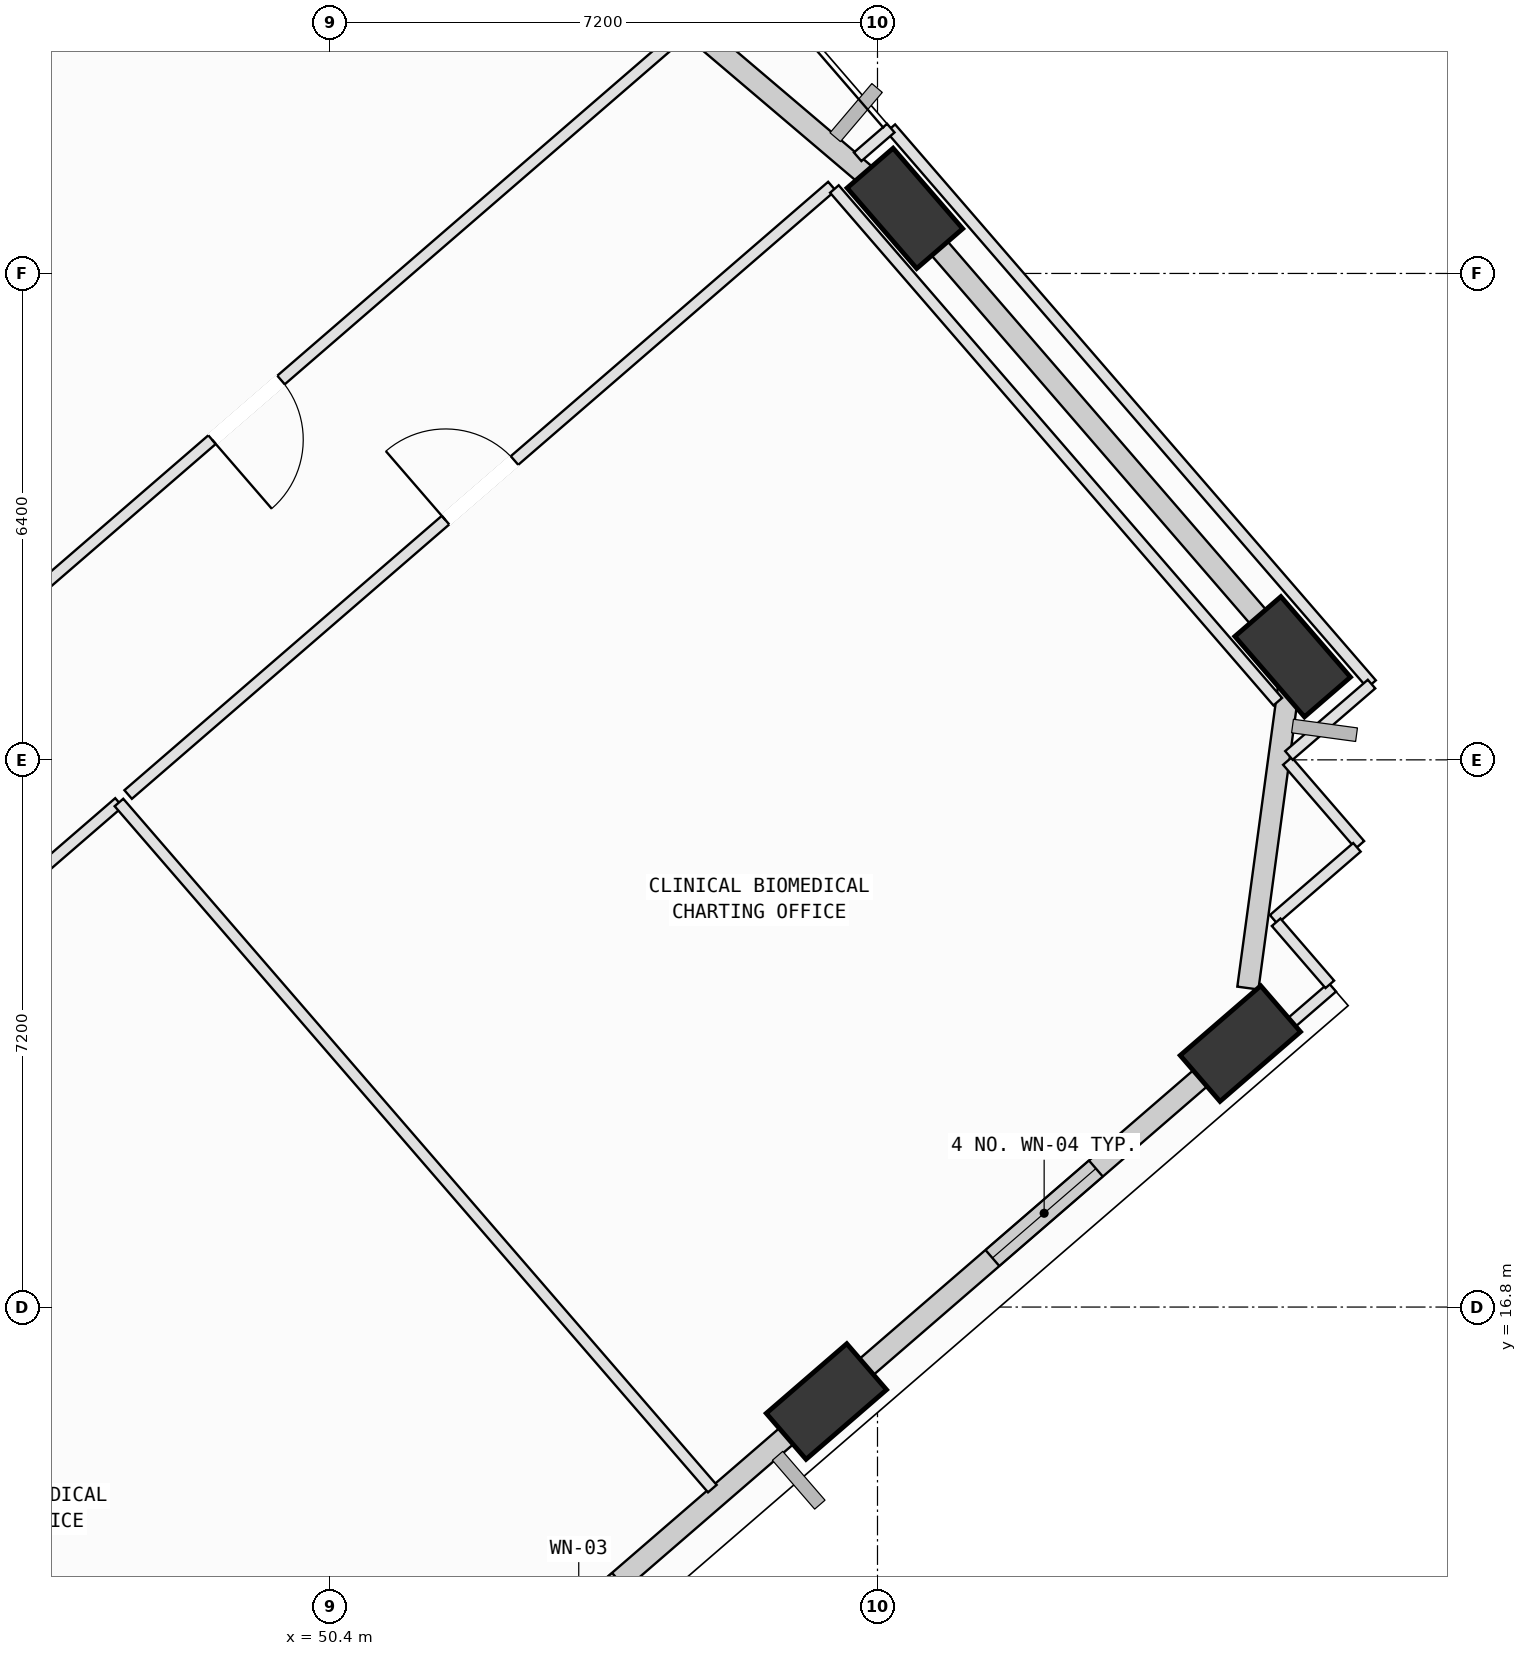
"""IFC4 building model, lengths in metres.
Left out: names, types, materials, properties, quantities, classifications, styles, units other than length and angle.
Written with IfcOpenShell. Run it as: python <this file> out.ifc"""

import sys

from ifc_helpers import new_model, si_unit, direction, frame, frame_2d, origin, origin_2d, place, context, subcontext, project, spatial, rectangle, extrude, element, fill, save


model = new_model("IFC4")
c1 = context("Model", 3, precision=1e-05, world=origin(), true_north=direction((0.0, 1.0)))
c2 = subcontext(c1, "Body", "Model", "MODEL_VIEW")
j1 = project(units=[si_unit("LENGTHUNIT", "METRE"), si_unit("PLANEANGLEUNIT", "RADIAN")], contexts=[c1])
p1 = place(None, origin())
s1 = spatial("IfcSite", under=j1, at=p1, CompositionType="ELEMENT")
p2 = place(p1, origin())
s2 = spatial("IfcBuilding", under=s1, at=p2, CompositionType="ELEMENT")
p3 = place(p2, frame((0.0, 0.0, 197.8)))
s3 = spatial("IfcBuildingStorey", under=s2, at=p3, CompositionType="ELEMENT", Elevation=197.8)
p4 = place(p3, frame((56.928, 15.557, 0.002), z_axis=(0.037308659292, 0.096492102534, 0.994634273535), x_axis=(-0.940140058416, -0.334002750608, 0.067667075804)))
e1 = element("IfcColumn", 1, at=p4, inside=s3, PredefinedType="COLUMN", context=c2, shape_type="SweptSolid", body=[
    extrude(rectangle(XDim=1.4, YDim=0.8, at=origin_2d()), origin(), (0.0, 0.0, 1.0), 4.018),
])
p5 = place(p3, frame((62.374, 20.267, 0.002), z_axis=(0.017710064667, 0.118511871091, 0.99279468674), x_axis=(-0.84409135877, -0.530440201598, 0.078377104935)))
e2 = element("IfcColumn", 2, at=p5, inside=s3, PredefinedType="COLUMN", context=c2, shape_type="SweptSolid", body=[
    extrude(rectangle(XDim=1.4, YDim=0.8, at=origin_2d()), origin(), (0.0, 0.0, 1.0), 4.025),
])
p6 = place(p3, frame((63.062, 25.356, 0.002), z_axis=(-0.003335213178, 0.121219838947, 0.992620081904), x_axis=(0.67448420136, -0.73256874744, 0.091728361977)))
e3 = element("IfcColumn", 3, at=p6, inside=s3, PredefinedType="COLUMN", context=c2, shape_type="SweptSolid", body=[
    extrude(rectangle(XDim=1.4, YDim=0.8, at=origin_2d()), origin(), (0.0, 0.0, 1.0), 4.026),
])
p7 = place(p3, frame((57.96, 31.257, 0.002), z_axis=(-0.027403036111, 0.100194249551, 0.994590461431), x_axis=(0.829382951697, -0.553127674355, 0.078572866163)))
e4 = element("IfcColumn", 4, at=p7, inside=s3, PredefinedType="COLUMN", context=c2, shape_type="SweptSolid", body=[
    extrude(rectangle(XDim=1.4, YDim=0.8, at=origin_2d()), origin(), (0.0, 0.0, 1.0), 4.018),
])
p8 = place(p3, frame((56.699, 15.359, 0.0), z_axis=(0.0, 0.0, 1.0), x_axis=(-0.756411472006, -0.654096082405, 0.0)))
e5 = element("IfcWall", 5, at=p8, inside=s3, PredefinedType="SOLIDWALL", context=c2, shape_type="SweptSolid", body=[
    extrude(rectangle(XDim=6.218, YDim=0.28, at=frame_2d((3.109, 0.0))), origin(), (0.0, 0.0, 1.0), 3.265),
])
p9 = place(p8, frame((3.305, 0.0, 0.75)))
e6 = element("IfcOpeningElement", 6, at=p9, cuts=e5, PredefinedType="OPENING", context=c2, shape_type="SweptSolid", body=[
    extrude(rectangle(XDim=1.4, YDim=1.85, at=frame_2d((0.7, 0.925))), frame((0.0, 0.15, 0.0), z_axis=(0.0, -1.0, 0.0), x_axis=(1.0, 0.0, 0.0)), (0.0, 0.0, 1.0), 0.3),
])
p10 = place(p3, frame((62.156, 20.078, 0.0), z_axis=(0.0, 0.0, 1.0), x_axis=(-0.756391936457, -0.654118673073, 0.0)))
e7 = element("IfcWall", 7, at=p10, inside=s3, PredefinedType="SOLIDWALL", context=c2, shape_type="SweptSolid", body=[
    extrude(rectangle(XDim=6.242, YDim=0.28, at=frame_2d((3.121, 0.0))), origin(), (0.0, 0.0, 1.0), 3.265),
])
p11 = place(p10, frame((2.225, 0.0, 0.75)))
e8 = element("IfcOpeningElement", 8, at=p11, cuts=e7, PredefinedType="OPENING", context=c2, shape_type="SweptSolid", body=[
    extrude(rectangle(XDim=1.8, YDim=2.05, at=frame_2d((0.9, 1.025))), frame((0.0, 0.15, 0.0), z_axis=(0.0, -1.0, 0.0), x_axis=(1.0, 0.0, 0.0)), (0.0, 0.0, 1.0), 0.3),
])
p12 = place(p3, frame((63.029, 25.105, 0.0), z_axis=(0.0, 0.0, 1.0), x_axis=(-0.134053903039, -0.990974041577, 0.0)))
e9 = element("IfcWall", 9, at=p12, inside=s3, PredefinedType="SOLIDWALL", context=c2, shape_type="SweptSolid", body=[
    extrude(rectangle(XDim=4.145, YDim=0.28, at=frame_2d((2.073, 0.0))), origin(), (0.0, 0.0, 1.0), 3.265),
])
p13 = place(p3, frame((58.156, 31.03, 0.0), z_axis=(0.0, 0.0, 1.0), x_axis=(0.654086255928, -0.756419969201, 0.0)))
e10 = element("IfcWall", 10, at=p13, inside=s3, PredefinedType="SOLIDWALL", context=c2, shape_type="SweptSolid", body=[
    extrude(rectangle(XDim=6.84, YDim=0.28, at=frame_2d((3.42, 0.0))), origin(), (0.0, 0.0, 1.0), 3.265),
])
p14 = place(p3, frame((50.728, 37.404, 0.0), z_axis=(0.0, 0.0, 1.0), x_axis=(0.761999294939, -0.647577852086, 0.0)))
e11 = element("IfcWall", 11, at=p14, inside=s3, PredefinedType="SOLIDWALL", context=c2, shape_type="SweptSolid", body=[
    extrude(rectangle(XDim=8.838, YDim=0.28, at=frame_2d((4.419, 0.0))), origin(), (0.0, 0.0, 1.0), 3.265),
])
p15 = place(p3, frame((38.362, 15.433, 0.0), z_axis=(0.0, 0.0, 1.0), x_axis=(0.756407982528, 0.654100117694, 0.0)))
e12 = element("IfcWall", 12, at=p15, inside=s3, PredefinedType="PARTITIONING", context=c2, shape_type="SweptSolid", body=[
    extrude(rectangle(XDim=12.24, YDim=0.15, at=frame_2d((6.12, 0.0))), origin(), (0.0, 0.0, 1.0), 3.78),
])
p16 = place(p15, frame((5.52, 0.0, 0.0)))
e13 = element("IfcOpeningElement", 13, at=p16, cuts=e12, PredefinedType="OPENING", context=c2, shape_type="SweptSolid", body=[
    extrude(rectangle(XDim=1.2, YDim=2.15, at=frame_2d((0.6, 1.075))), frame((0.0, 0.085, 0.0), z_axis=(0.0, -1.0, 0.0), x_axis=(1.0, 0.0, 0.0)), (0.0, 0.0, 1.0), 0.17),
])
p17 = place(p3, frame((47.62, 23.439, 0.0), z_axis=(0.0, 0.0, 1.0), x_axis=(0.654095318202, -0.756412132839, 0.0)))
e14 = element("IfcWall", 14, at=p17, inside=s3, PredefinedType="PARTITIONING", context=c2, shape_type="SweptSolid", body=[
    extrude(rectangle(XDim=11.935, YDim=0.15, at=frame_2d((5.968, 0.0))), origin(), (0.0, 0.0, 1.0), 3.78),
])
p18 = place(p3, frame((63.584, 21.008, 0.0), z_axis=(0.0, 0.0, 1.0), x_axis=(-0.756513998458, -0.653977499718, 0.0)))
e15 = element("IfcWall", 15, at=p18, inside=s3, PredefinedType="PARTITIONING", context=c2, shape_type="SweptSolid", body=[
    extrude(rectangle(XDim=1.688, YDim=0.15, at=frame_2d((0.844, 0.0))), origin(), (0.0, 0.0, 1.0), 3.78),
])
p19 = place(p3, frame((57.585, 15.822, 0.0), z_axis=(0.0, 0.0, 1.0), x_axis=(-0.75607796625, -0.654481557381, 0.0)))
e16 = element("IfcWall", 16, at=p19, inside=s3, PredefinedType="PARTITIONING", context=c2, shape_type="SweptSolid", body=[
    extrude(rectangle(XDim=0.973, YDim=0.15, at=frame_2d((0.487, 0.0))), origin(), (0.0, 0.0, 1.0), 3.265),
])
p20 = place(p3, frame((47.741, 23.544, 0.0), z_axis=(0.0, 0.0, 1.0), x_axis=(0.756471721777, 0.654026401723, 0.0)))
e17 = element("IfcWall", 17, at=p20, inside=s3, PredefinedType="PARTITIONING", context=c2, shape_type="SweptSolid", body=[
    extrude(rectangle(XDim=12.24, YDim=0.15, at=frame_2d((6.12, 0.0))), origin(), (0.0, 0.0, 1.0), 3.065),
])
p21 = place(p20, frame((5.52, 0.0, 0.0)))
e18 = element("IfcOpeningElement", 18, at=p21, cuts=e17, PredefinedType="OPENING", context=c2, shape_type="SweptSolid", body=[
    extrude(rectangle(XDim=1.2, YDim=2.15, at=frame_2d((0.6, 1.075))), frame((0.0, 0.085, 0.0), z_axis=(0.0, -1.0, 0.0), x_axis=(1.0, 0.0, 0.0)), (0.0, 0.0, 1.0), 0.17),
])
p22 = place(p3, frame((57.033, 31.511, 0.0), z_axis=(0.0, 0.0, 1.0), x_axis=(0.654058807324, -0.756443703498, 0.0)))
e19 = element("IfcWall", 19, at=p22, inside=s3, PredefinedType="PARTITIONING", context=c2, shape_type="SweptSolid", body=[
    extrude(rectangle(XDim=8.918, YDim=0.15, at=frame_2d((4.459, 0.0))), origin(), (0.0, 0.0, 1.0), 3.78),
])
p23 = place(p3, frame((62.993, 23.984, 0.0), z_axis=(0.0, 0.0, 1.0), x_axis=(0.654234843955, -0.756291457677, 0.0)))
e20 = element("IfcWall", 20, at=p23, inside=s3, PredefinedType="PARTITIONING", context=c2, shape_type="SweptSolid", body=[
    extrude(rectangle(XDim=1.457, YDim=0.15, at=frame_2d((0.729, 0.0))), origin(), (0.0, 0.0, 1.0), 3.78),
])
p24 = place(p3, frame((63.908, 22.849, 0.0), z_axis=(0.0, 0.0, 1.0), x_axis=(-0.756227992108, -0.654308202572, 0.0)))
e21 = element("IfcWall", 21, at=p24, inside=s3, PredefinedType="PARTITIONING", context=c2, shape_type="SweptSolid", body=[
    extrude(rectangle(XDim=1.449, YDim=0.15, at=frame_2d((0.725, 0.0))), origin(), (0.0, 0.0, 1.0), 3.78),
])
p25 = place(p3, frame((62.845, 21.863, 0.0), z_axis=(0.0, 0.0, 1.0), x_axis=(0.653802314779, -0.756665403722, 0.0)))
e22 = element("IfcWall", 22, at=p25, inside=s3, PredefinedType="PARTITIONING", context=c2, shape_type="SweptSolid", body=[
    extrude(rectangle(XDim=1.08, YDim=0.15, at=frame_2d((0.54, 0.0))), origin(), (0.0, 0.0, 1.0), 3.78),
])
p26 = place(p3, frame((55.05, 33.579, 0.0), z_axis=(0.0, 0.0, 1.0), x_axis=(-0.756410615278, -0.654097073144, 0.0)))
e23 = element("IfcWall", 23, at=p26, inside=s3, PredefinedType="PARTITIONING", context=c2, shape_type="SweptSolid", body=[
    extrude(rectangle(XDim=15.207, YDim=0.15, at=frame_2d((7.604, 0.0))), origin(), (0.0, 0.0, 1.0), 3.78),
])
p27 = place(p26, frame((7.004, 0.0, 0.0)))
e24 = element("IfcOpeningElement", 24, at=p27, cuts=e23, PredefinedType="OPENING", context=c2, shape_type="SweptSolid", body=[
    extrude(rectangle(XDim=1.2, YDim=2.15, at=frame_2d((0.6, 1.075))), frame((0.0, 0.085, 0.0), z_axis=(0.0, -1.0, 0.0), x_axis=(1.0, 0.0, 0.0)), (0.0, 0.0, 1.0), 0.17),
])
p28 = place(p3, frame((39.237, 28.616, 0.0), z_axis=(0.0, 0.0, 1.0), x_axis=(0.756425666374, 0.654079667357, 0.0)))
e25 = element("IfcWall", 25, at=p28, inside=s3, PredefinedType="PARTITIONING", context=c2, shape_type="SweptSolid", body=[
    extrude(rectangle(XDim=14.94, YDim=0.15, at=frame_2d((7.47, 0.0))), origin(), (0.0, 0.0, 1.0), 3.065),
])
p29 = place(p3, frame((57.775, 32.312, 0.0), z_axis=(0.0, 0.0, 1.0), x_axis=(0.654078543908, -0.756426637817, 0.0)))
e26 = element("IfcWall", 26, at=p29, inside=s3, PredefinedType="PARTITIONING", context=c2, shape_type="SweptSolid", body=[
    extrude(rectangle(XDim=9.67, YDim=0.15, at=frame_2d((4.835, 0.0))), origin(), (0.0, 0.0, 1.0), 3.265),
])
p30 = place(p3, frame((64.1, 24.997, 0.0), z_axis=(0.0, 0.0, 1.0), x_axis=(-0.756803900223, -0.653641994219, 0.0)))
e27 = element("IfcWall", 27, at=p30, inside=s3, PredefinedType="PARTITIONING", context=c2, shape_type="SweptSolid", body=[
    extrude(rectangle(XDim=1.437, YDim=0.15, at=frame_2d((0.718, 0.0))), origin(), (0.0, 0.0, 1.0), 3.78),
])
p31 = place(p3, frame((57.339, 31.935, 0.0), z_axis=(0.0, 0.0, 1.0), x_axis=(0.756317842967, 0.654204341479, 0.0)))
e28 = element("IfcWall", 28, at=p31, inside=s3, PredefinedType="PARTITIONING", context=c2, shape_type="SweptSolid", body=[
    extrude(rectangle(XDim=0.576, YDim=0.15, at=frame_2d((0.288, 0.0))), origin(), (0.0, 0.0, 1.0), 3.78),
])
p32 = place(p11, origin())
e29 = element("IfcWindow", 29, at=p32, inside=s3, PartitioningType="SINGLE_PANEL", PredefinedType="WINDOW", context=c2, shape_type="SweptSolid", body=[
    extrude(rectangle(XDim=1.8, YDim=2.05, at=frame_2d((0.9, 1.025))), frame((0.0, 0.03, 0.0), z_axis=(0.0, -1.0, 0.0), x_axis=(1.0, 0.0, 0.0)), (0.0, 0.0, 1.0), 0.06),
])
fill(e8, e29)
p33 = place(p21, origin())
e30 = element("IfcDoor", 30, at=p33, inside=s3, OperationType="SINGLE_SWING_LEFT", PredefinedType="DOOR", context=c2, shape_type="SweptSolid", body=[
    extrude(rectangle(XDim=1.2, YDim=2.15, at=frame_2d((0.6, 1.075))), frame((0.0, 0.025, 0.0), z_axis=(0.0, -1.0, 0.0), x_axis=(1.0, 0.0, 0.0)), (0.0, 0.0, 1.0), 0.05),
])
fill(e18, e30)
p34 = place(p27, origin())
e31 = element("IfcDoor", 31, at=p34, inside=s3, OperationType="SINGLE_SWING_RIGHT", PredefinedType="DOOR", context=c2, shape_type="SweptSolid", body=[
    extrude(rectangle(XDim=1.2, YDim=2.15, at=frame_2d((0.6, 1.075))), frame((0.0, 0.025, 0.0), z_axis=(0.0, -1.0, 0.0), x_axis=(1.0, 0.0, 0.0)), (0.0, 0.0, 1.0), 0.05),
])
fill(e24, e31)
save(model, sys.argv[1])
